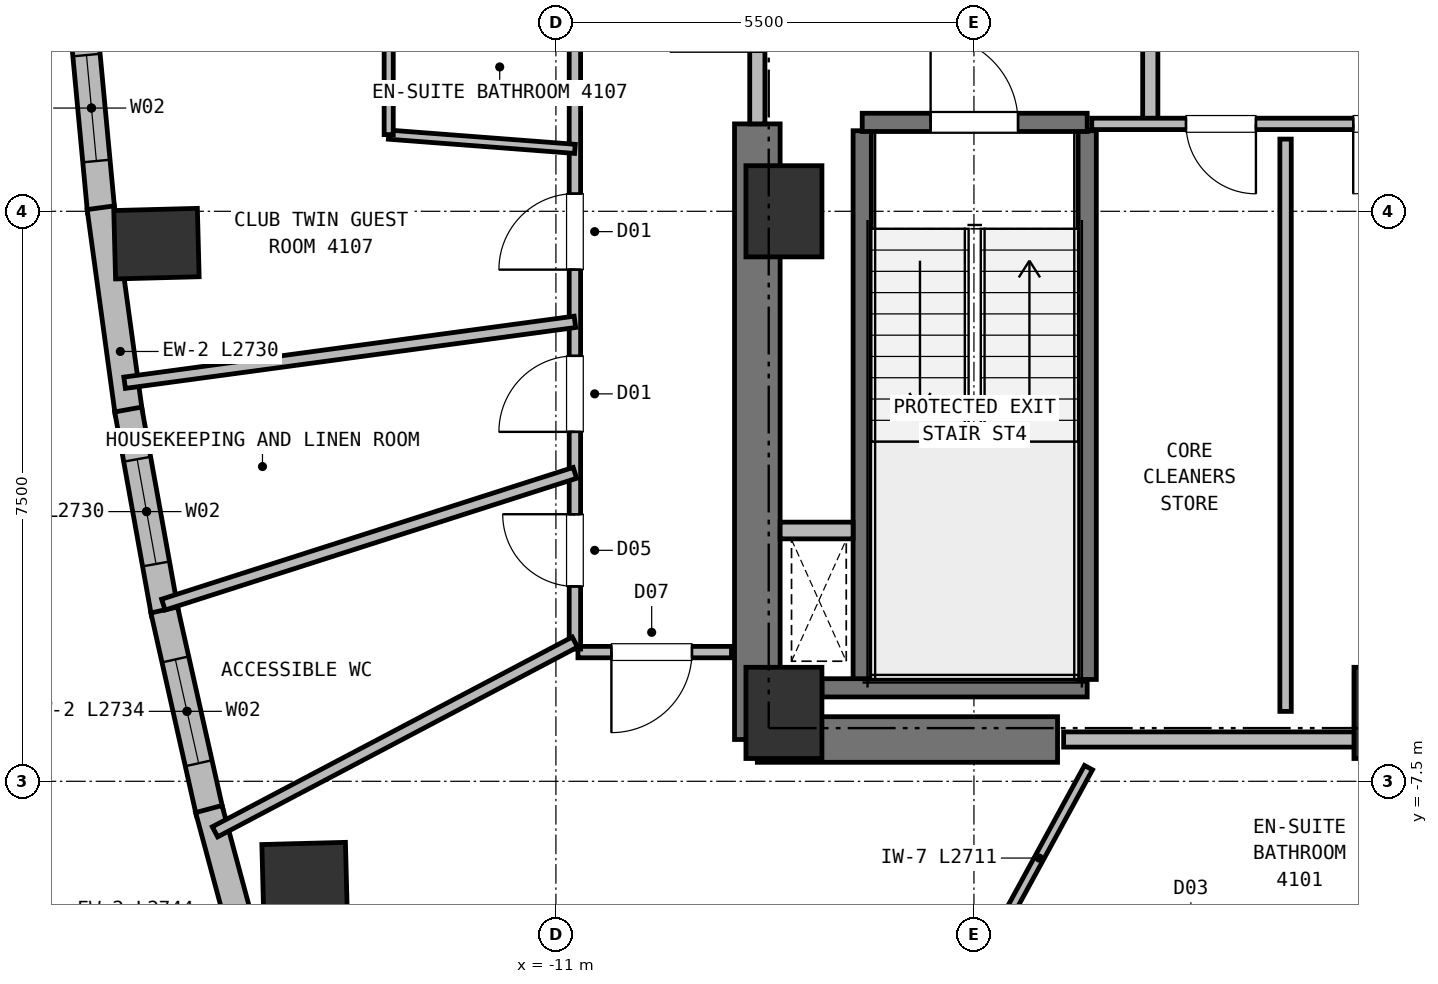
"""IFC4 building model, lengths in metres.
Left out: names, types, materials, properties, quantities, classifications, styles, units other than length and angle.
Written with IfcOpenShell. Run it as: python <this file> out.ifc"""

import sys

from ifc_helpers import new_model, si_unit, direction, frame, frame_2d, origin, origin_2d, place, context, subcontext, project, spatial, rectangle, extrude, element, fill, save


model = new_model("IFC4")
c1 = context("Model", 3, precision=1e-05, world=origin(), true_north=direction((0.0, 1.0)))
c2 = subcontext(c1, "Body", "Model", "MODEL_VIEW")
j1 = project(units=[si_unit("LENGTHUNIT", "METRE"), si_unit("PLANEANGLEUNIT", "RADIAN")], contexts=[c1])
p1 = place(None, origin())
s1 = spatial("IfcSite", under=j1, at=p1, CompositionType="ELEMENT")
p2 = place(p1, origin())
s2 = spatial("IfcBuilding", under=s1, at=p2, CompositionType="ELEMENT")
p3 = place(p2, frame((0.0, 0.0, 153.5)))
s3 = spatial("IfcBuildingStorey", under=s2, at=p3, CompositionType="ELEMENT", Elevation=153.5)
for number, where, z_axis, x_axis in (
    (1, (-8.0, -6.6, 0.0), (0.0, 0.0, 1.0), (1.0, 0.0, 0.0)),
    (2, (0.0, -6.6, 0.0), (0.0, 0.0, 1.0), (1.0, 0.0, 0.0)),
    (3, (-8.0, 0.0, 0.0), (0.0, 0.0, 1.0), (1.0, 0.0, 0.0)),
):
    element("IfcColumn", number, at=place(p3, frame(where, z_axis=z_axis, x_axis=x_axis)), inside=s3, PredefinedType="COLUMN", context=c2, shape_type="SweptSolid", body=[
        extrude(rectangle(XDim=1.0, YDim=1.2, at=origin_2d()), origin(), (0.0, 0.0, 1.0), 3.75),
    ])
p4 = place(p3, frame((-8.35, -6.95, 0.0), z_axis=(0.0, 0.0, 1.0), x_axis=(1.0, 0.0, 0.0)))
e4 = element("IfcWall", 4, at=p4, inside=s3, PredefinedType="SHEAR", context=c2, shape_type="SweptSolid", body=[
    extrude(rectangle(XDim=3.95, YDim=0.6, at=frame_2d((1.975, 0.0))), origin(), (0.0, 0.0, 1.0), 3.5),
])
p5 = place(p3, frame((-8.35, -6.95, 0.0), z_axis=(0.0, 0.0, 1.0), x_axis=(0.0, 1.0, 0.0)))
e5 = element("IfcWall", 5, at=p5, inside=s3, PredefinedType="SHEAR", context=c2, shape_type="SweptSolid", body=[
    extrude(rectangle(XDim=8.1, YDim=0.6, at=frame_2d((4.05, 0.0))), origin(), (0.0, 0.0, 1.0), 3.5),
])
for number, where, z_axis, x_axis in (
    (6, (-16.255, -0.426, 0.0), (0.0, 0.0, 1.0), (-0.026, 1.0, 0.0)),
    (7, (-14.307, -8.768, 0.0), (0.0, 0.0, 1.0), (-0.026, 1.0, 0.0)),
):
    element("IfcColumn", number, at=place(p3, frame(where, z_axis=z_axis, x_axis=x_axis)), inside=s3, PredefinedType="COLUMN", context=c2, shape_type="SweptSolid", body=[
        extrude(rectangle(XDim=0.9, YDim=1.1, at=origin_2d()), origin(), (0.0, 0.0, 1.0), 3.75),
    ])
p6 = place(p3, frame((-16.983, -0.003, 0.0), z_axis=(0.0, 0.0, 1.0), x_axis=(-0.09321624124, 0.995645887035, 0.0)))
e8 = element("IfcWall", 8, at=p6, inside=s3, PredefinedType="SOLIDWALL", context=c2, shape_type="SweptSolid", body=[
    extrude(rectangle(XDim=2.734, YDim=0.36, at=frame_2d((1.367, 0.0))), origin(), (0.0, 0.0, 1.0), 3.5),
])
p7 = place(p6, frame((0.667, 0.0, 0.72)))
e9 = element("IfcOpeningElement", 9, at=p7, cuts=e8, PredefinedType="OPENING", context=c2, shape_type="SweptSolid", body=[
    extrude(rectangle(XDim=1.4, YDim=1.84, at=frame_2d((0.7, 0.92))), frame((0.0, 0.19, 0.0), z_axis=(0.0, -1.0, 0.0), x_axis=(1.0, 0.0, 0.0)), (0.0, 0.0, 1.0), 0.38),
])
p8 = place(p3, frame((-16.62, -2.658, 0.0), z_axis=(0.0, 0.0, 1.0), x_axis=(-0.135408542402, 0.99078984989, 0.0)))
e10 = element("IfcWall", 10, at=p8, inside=s3, PredefinedType="SOLIDWALL", context=c2, shape_type="SweptSolid", body=[
    extrude(rectangle(XDim=2.73, YDim=0.36, at=frame_2d((1.365, 0.0))), origin(), (0.0, 0.0, 1.0), 3.5),
])
p9 = place(p3, frame((-16.143, -5.294, 0.0), z_axis=(0.0, 0.0, 1.0), x_axis=(-0.177366119488, 0.984144938339, 0.0)))
e11 = element("IfcWall", 11, at=p9, inside=s3, PredefinedType="SOLIDWALL", context=c2, shape_type="SweptSolid", body=[
    extrude(rectangle(XDim=2.729, YDim=0.36, at=frame_2d((1.365, 0.0))), origin(), (0.0, 0.0, 1.0), 3.5),
])
p10 = place(p9, frame((0.665, 0.0, 0.72)))
e12 = element("IfcOpeningElement", 12, at=p10, cuts=e11, PredefinedType="OPENING", context=c2, shape_type="SweptSolid", body=[
    extrude(rectangle(XDim=1.4, YDim=1.84, at=frame_2d((0.7, 0.92))), frame((0.0, 0.19, 0.0), z_axis=(0.0, -1.0, 0.0), x_axis=(1.0, 0.0, 0.0)), (0.0, 0.0, 1.0), 0.38),
])
p11 = place(p3, frame((-15.554, -7.914, 0.0), z_axis=(0.0, 0.0, 1.0), x_axis=(-0.219019260065, 0.975720535666, 0.0)))
e13 = element("IfcWall", 13, at=p11, inside=s3, PredefinedType="SOLIDWALL", context=c2, shape_type="SweptSolid", body=[
    extrude(rectangle(XDim=2.734, YDim=0.36, at=frame_2d((1.367, 0.0))), origin(), (0.0, 0.0, 1.0), 3.5),
])
p12 = place(p11, frame((0.667, 0.0, 0.72)))
e14 = element("IfcOpeningElement", 14, at=p12, cuts=e13, PredefinedType="OPENING", context=c2, shape_type="SweptSolid", body=[
    extrude(rectangle(XDim=1.4, YDim=1.84, at=frame_2d((0.7, 0.92))), frame((0.0, 0.19, 0.0), z_axis=(0.0, -1.0, 0.0), x_axis=(1.0, 0.0, 0.0)), (0.0, 0.0, 1.0), 0.38),
])
p13 = place(p3, frame((-14.853, -10.515, 0.0), z_axis=(0.0, 0.0, 1.0), x_axis=(-0.259976664172, 0.965614899474, 0.0)))
e15 = element("IfcWall", 15, at=p13, inside=s3, PredefinedType="SOLIDWALL", context=c2, shape_type="SweptSolid", body=[
    extrude(rectangle(XDim=2.744, YDim=0.36, at=frame_2d((1.372, 0.0))), origin(), (0.0, 0.0, 1.0), 3.5),
])
p14 = place(p3, frame((-6.97, -6.16, 0.0), z_axis=(0.0, 0.0, 1.0), x_axis=(0.0, 1.0, 0.0)))
e16 = element("IfcWall", 16, at=p14, inside=s3, PredefinedType="SHEAR", context=c2, shape_type="SweptSolid", body=[
    extrude(rectangle(XDim=7.22, YDim=0.24, at=frame_2d((3.61, 0.0))), origin(), (0.0, 0.0, 1.0), 3.5),
])
p15 = place(p3, frame((-7.5, -6.27, 0.0), z_axis=(0.0, 0.0, 1.0), x_axis=(1.0, 0.0, 0.0)))
e17 = element("IfcWall", 17, at=p15, inside=s3, PredefinedType="SHEAR", context=c2, shape_type="SweptSolid", body=[
    extrude(rectangle(XDim=3.49, YDim=0.24, at=frame_2d((1.745, 0.0))), origin(), (0.0, 0.0, 1.0), 3.5),
])
p16 = place(p3, frame((-4.01, -6.16, 0.0), z_axis=(0.0, 0.0, 1.0), x_axis=(0.0, 1.0, 0.0)))
e18 = element("IfcWall", 18, at=p16, inside=s3, PredefinedType="SHEAR", context=c2, shape_type="SweptSolid", body=[
    extrude(rectangle(XDim=7.22, YDim=0.24, at=frame_2d((3.61, 0.0))), origin(), (0.0, 0.0, 1.0), 3.5),
])
p17 = place(p3, frame((-6.97, 1.17, 0.0), z_axis=(0.0, 0.0, 1.0), x_axis=(1.0, 0.0, 0.0)))
e19 = element("IfcWall", 19, at=p17, inside=s3, PredefinedType="SHEAR", context=c2, shape_type="SweptSolid", body=[
    extrude(rectangle(XDim=2.96, YDim=0.24, at=frame_2d((1.48, 0.0))), origin(), (0.0, 0.0, 1.0), 3.5),
])
p18 = place(p17, frame((0.9, 0.0, 0.0)))
e20 = element("IfcOpeningElement", 20, at=p18, cuts=e19, PredefinedType="OPENING", context=c2, shape_type="SweptSolid", body=[
    extrude(rectangle(XDim=1.15, YDim=2.15, at=frame_2d((0.575, 1.075))), frame((0.0, 0.13, 0.0), z_axis=(0.0, -1.0, 0.0), x_axis=(1.0, 0.0, 0.0)), (0.0, 0.0, 1.0), 0.26),
])
p19 = place(p3, frame((-8.05, -4.2, 0.0), z_axis=(0.0, 0.0, 1.0), x_axis=(1.0, 0.0, 0.0)))
e21 = element("IfcWall", 21, at=p19, inside=s3, PredefinedType="PARTITIONING", context=c2, shape_type="SweptSolid", body=[
    extrude(rectangle(XDim=0.96, YDim=0.22, at=frame_2d((0.48, 0.0))), origin(), (0.0, 0.0, 1.0), 3.5),
])
p20 = place(p3, frame((-3.18, 1.15, 0.0), z_axis=(0.0, 0.0, 1.0), x_axis=(0.0, 1.0, 0.0)))
e22 = element("IfcWall", 22, at=p20, inside=s3, PredefinedType="PARTITIONING", context=c2, shape_type="SweptSolid", body=[
    extrude(rectangle(XDim=3.3, YDim=0.2, at=frame_2d((1.65, 0.0))), origin(), (0.0, 0.0, 1.0), 3.5),
])
p21 = place(p20, frame((1.08, 0.0, 0.0)))
e23 = element("IfcOpeningElement", 23, at=p21, cuts=e22, PredefinedType="OPENING", context=c2, shape_type="SweptSolid", body=[
    extrude(rectangle(XDim=1.15, YDim=2.15, at=frame_2d((0.575, 1.075))), frame((0.0, 0.11, 0.0), z_axis=(0.0, -1.0, 0.0), x_axis=(1.0, 0.0, 0.0)), (0.0, 0.0, 1.0), 0.22),
])
p22 = place(p3, frame((-8.35, 1.15, 0.0), z_axis=(0.0, 0.0, 1.0), x_axis=(0.0, 1.0, 0.0)))
e24 = element("IfcWall", 24, at=p22, inside=s3, PredefinedType="PARTITIONING", context=c2, shape_type="SweptSolid", body=[
    extrude(rectangle(XDim=5.4, YDim=0.2, at=frame_2d((2.7, 0.0))), origin(), (0.0, 0.0, 1.0), 3.5),
])
p23 = place(p22, frame((0.95, 0.0, 0.0)))
e25 = element("IfcOpeningElement", 25, at=p23, cuts=e24, PredefinedType="OPENING", context=c2, shape_type="SweptSolid", body=[
    extrude(rectangle(XDim=1.15, YDim=2.15, at=frame_2d((0.575, 1.075))), frame((0.0, 0.11, 0.0), z_axis=(0.0, -1.0, 0.0), x_axis=(1.0, 0.0, 0.0)), (0.0, 0.0, 1.0), 0.22),
])
p24 = place(p3, frame((3.95, 1.15, 0.0), z_axis=(0.0, 0.0, 1.0), x_axis=(-1.0, 0.0, 0.0)))
e26 = element("IfcWall", 26, at=p24, inside=s3, PredefinedType="PARTITIONING", context=c2, shape_type="SweptSolid", body=[
    extrude(rectangle(XDim=7.9, YDim=0.15, at=frame_2d((3.95, 0.0))), origin(), (0.0, 0.0, 1.0), 3.5),
])
p25 = place(p24, frame((5.74, 0.0, 0.0)))
e27 = element("IfcOpeningElement", 27, at=p25, cuts=e26, PredefinedType="OPENING", context=c2, shape_type="SweptSolid", body=[
    extrude(rectangle(XDim=0.92, YDim=2.05, at=frame_2d((0.46, 1.025))), frame((0.0, 0.085, 0.0), z_axis=(0.0, -1.0, 0.0), x_axis=(1.0, 0.0, 0.0)), (0.0, 0.0, 1.0), 0.17),
])
p26 = place(p24, frame((3.54, 0.0, 0.0)))
e28 = element("IfcOpeningElement", 28, at=p26, cuts=e26, PredefinedType="OPENING", context=c2, shape_type="SweptSolid", body=[
    extrude(rectangle(XDim=0.92, YDim=2.05, at=frame_2d((0.46, 1.025))), frame((0.0, 0.085, 0.0), z_axis=(0.0, -1.0, 0.0), x_axis=(1.0, 0.0, 0.0)), (0.0, 0.0, 1.0), 0.17),
])
p27 = place(p24, frame((1.29, 0.0, 0.0)))
e29 = element("IfcOpeningElement", 29, at=p27, cuts=e26, PredefinedType="OPENING", context=c2, shape_type="SweptSolid", body=[
    extrude(rectangle(XDim=0.92, YDim=2.05, at=frame_2d((0.46, 1.025))), frame((0.0, 0.085, 0.0), z_axis=(0.0, -1.0, 0.0), x_axis=(1.0, 0.0, 0.0)), (0.0, 0.0, 1.0), 0.17),
])
p28 = place(p3, frame((-4.32, -6.95, 0.0), z_axis=(0.0, 0.0, 1.0), x_axis=(1.0, 0.0, 0.0)))
e30 = element("IfcWall", 30, at=p28, inside=s3, PredefinedType="PARTITIONING", context=c2, shape_type="SweptSolid", body=[
    extrude(rectangle(XDim=4.32, YDim=0.2, at=frame_2d((2.16, 0.0))), origin(), (0.0, 0.0, 1.0), 3.5),
])
p29 = place(p3, frame((-1.4, -6.58, 0.0), z_axis=(0.0, 0.0, 1.0), x_axis=(0.0, 1.0, 0.0)))
e31 = element("IfcWall", 31, at=p29, inside=s3, PredefinedType="PARTITIONING", context=c2, shape_type="SweptSolid", body=[
    extrude(rectangle(XDim=7.53, YDim=0.15, at=frame_2d((3.765, 0.0))), origin(), (0.0, 0.0, 1.0), 3.5),
])
p30 = place(p3, frame((-8.69, -5.8, 0.0), z_axis=(0.0, 0.0, 1.0), x_axis=(-1.0, 0.0, 0.0)))
e32 = element("IfcWall", 32, at=p30, inside=s3, PredefinedType="PARTITIONING", context=c2, shape_type="SweptSolid", body=[
    extrude(rectangle(XDim=2.02, YDim=0.15, at=frame_2d((1.01, 0.0))), origin(), (0.0, 0.0, 1.0), 3.5),
])
p31 = place(p30, frame((0.52, 0.0, 0.0)))
e33 = element("IfcOpeningElement", 33, at=p31, cuts=e32, PredefinedType="OPENING", context=c2, shape_type="SweptSolid", body=[
    extrude(rectangle(XDim=1.06, YDim=2.15, at=frame_2d((0.53, 1.075))), frame((0.0, 0.085, 0.0), z_axis=(0.0, -1.0, 0.0), x_axis=(1.0, 0.0, 0.0)), (0.0, 0.0, 1.0), 0.17),
])
p32 = place(p3, frame((-10.75, -5.76, 0.0), z_axis=(0.0, 0.0, 1.0), x_axis=(0.0, 1.0, 0.0)))
e34 = element("IfcWall", 34, at=p32, inside=s3, PredefinedType="PARTITIONING", context=c2, shape_type="SweptSolid", body=[
    extrude(rectangle(XDim=12.92, YDim=0.15, at=frame_2d((6.46, 0.0))), origin(), (0.0, 0.0, 1.0), 3.5),
])
p33 = place(p32, frame((0.824, 0.0, 0.0)))
e35 = element("IfcOpeningElement", 35, at=p33, cuts=e34, PredefinedType="OPENING", context=c2, shape_type="SweptSolid", body=[
    extrude(rectangle(XDim=0.95, YDim=2.1, at=frame_2d((0.475, 1.05))), frame((0.0, 0.085, 0.0), z_axis=(0.0, -1.0, 0.0), x_axis=(1.0, 0.0, 0.0)), (0.0, 0.0, 1.0), 0.17),
])
p34 = place(p32, frame((2.858, 0.0, 0.0)))
e36 = element("IfcOpeningElement", 36, at=p34, cuts=e34, PredefinedType="OPENING", context=c2, shape_type="SweptSolid", body=[
    extrude(rectangle(XDim=1.0, YDim=2.15, at=frame_2d((0.5, 1.075))), frame((0.0, 0.085, 0.0), z_axis=(0.0, -1.0, 0.0), x_axis=(1.0, 0.0, 0.0)), (0.0, 0.0, 1.0), 0.17),
])
p35 = place(p32, frame((4.992, 0.0, 0.0)))
e37 = element("IfcOpeningElement", 37, at=p35, cuts=e34, PredefinedType="OPENING", context=c2, shape_type="SweptSolid", body=[
    extrude(rectangle(XDim=1.0, YDim=2.15, at=frame_2d((0.5, 1.075))), frame((0.0, 0.085, 0.0), z_axis=(0.0, -1.0, 0.0), x_axis=(1.0, 0.0, 0.0)), (0.0, 0.0, 1.0), 0.17),
])
p36 = place(p32, frame((10.523, 0.0, 0.0)))
e38 = element("IfcOpeningElement", 38, at=p36, cuts=e34, PredefinedType="OPENING", context=c2, shape_type="SweptSolid", body=[
    extrude(rectangle(XDim=1.0, YDim=2.15, at=frame_2d((0.5, 1.075))), frame((0.0, 0.085, 0.0), z_axis=(0.0, -1.0, 0.0), x_axis=(1.0, 0.0, 0.0)), (0.0, 0.0, 1.0), 0.17),
])
p37 = place(p3, frame((-10.75, -5.668, 0.0), z_axis=(0.0, 0.0, 1.0), x_axis=(-0.884578678767, -0.466390995915, 0.0)))
e39 = element("IfcWall", 39, at=p37, inside=s3, PredefinedType="PARTITIONING", context=c2, shape_type="SweptSolid", body=[
    extrude(rectangle(XDim=5.354, YDim=0.15, at=frame_2d((2.677, 0.0))), origin(), (0.0, 0.0, 1.0), 3.5),
])
p38 = place(p3, frame((-3.993, -7.32, 0.0), z_axis=(0.0, 0.0, 1.0), x_axis=(-0.478915225664, -0.877861154527, 0.0)))
e40 = element("IfcWall", 40, at=p38, inside=s3, PredefinedType="PARTITIONING", context=c2, shape_type="SweptSolid", body=[
    extrude(rectangle(XDim=2.711, YDim=0.12, at=frame_2d((1.355, 0.0))), origin(), (0.0, 0.0, 1.0), 3.5),
])
p39 = place(p3, frame((-13.2, 1.009, 0.0), z_axis=(0.0, 0.0, 1.0), x_axis=(0.997091773564, -0.076210203321, 0.0)))
e41 = element("IfcWall", 41, at=p39, inside=s3, PredefinedType="PARTITIONING", context=c2, shape_type="SweptSolid", body=[
    extrude(rectangle(XDim=2.457, YDim=0.12, at=frame_2d((1.229, 0.0))), origin(), (0.0, 0.0, 1.0), 3.5),
])
p40 = place(p3, frame((-13.2, 1.009, 0.0), z_axis=(0.0, 0.0, 1.0), x_axis=(0.0, 1.0, 0.0)))
e42 = element("IfcWall", 42, at=p40, inside=s3, PredefinedType="PARTITIONING", context=c2, shape_type="SweptSolid", body=[
    extrude(rectangle(XDim=3.247, YDim=0.12, at=frame_2d((1.624, 0.0))), origin(), (0.0, 0.0, 1.0), 3.5),
])
p41 = place(p40, frame((1.164, 0.0, 0.0)))
e43 = element("IfcOpeningElement", 43, at=p41, cuts=e42, PredefinedType="OPENING", context=c2, shape_type="SweptSolid", body=[
    extrude(rectangle(XDim=0.92, YDim=2.1, at=frame_2d((0.46, 1.05))), frame((0.0, 0.07, 0.0), z_axis=(0.0, -1.0, 0.0), x_axis=(1.0, 0.0, 0.0)), (0.0, 0.0, 1.0), 0.14),
])
p42 = place(p3, frame((-10.75, -1.455, 0.0), z_axis=(0.0, 0.0, 1.0), x_axis=(-0.990972499341, -0.134065303306, 0.0)))
e44 = element("IfcWall", 44, at=p42, inside=s3, PredefinedType="PARTITIONING", context=c2, shape_type="SweptSolid", body=[
    extrude(rectangle(XDim=5.979, YDim=0.15, at=frame_2d((2.989, 0.0))), origin(), (0.0, 0.0, 1.0), 3.5),
])
p43 = place(p3, frame((-10.75, -3.442, 0.0), z_axis=(0.0, 0.0, 1.0), x_axis=(-0.952377767895, -0.304920624457, 0.0)))
e45 = element("IfcWall", 45, at=p43, inside=s3, PredefinedType="PARTITIONING", context=c2, shape_type="SweptSolid", body=[
    extrude(rectangle(XDim=5.686, YDim=0.15, at=frame_2d((2.843, 0.0))), origin(), (0.0, 0.0, 1.0), 3.5),
])
p44 = place(p7, origin())
e46 = element("IfcWindow", 46, at=p44, inside=s3, PartitioningType="SINGLE_PANEL", PredefinedType="WINDOW", context=c2, shape_type="SweptSolid", body=[
    extrude(rectangle(XDim=1.4, YDim=1.84, at=frame_2d((0.7, 0.92))), frame((0.0, 0.03, 0.0), z_axis=(0.0, -1.0, 0.0), x_axis=(1.0, 0.0, 0.0)), (0.0, 0.0, 1.0), 0.06),
])
fill(e9, e46)
p45 = place(p10, origin())
e47 = element("IfcWindow", 47, at=p45, inside=s3, PartitioningType="SINGLE_PANEL", PredefinedType="WINDOW", context=c2, shape_type="SweptSolid", body=[
    extrude(rectangle(XDim=1.4, YDim=1.84, at=frame_2d((0.7, 0.92))), frame((0.0, 0.03, 0.0), z_axis=(0.0, -1.0, 0.0), x_axis=(1.0, 0.0, 0.0)), (0.0, 0.0, 1.0), 0.06),
])
fill(e12, e47)
p46 = place(p12, origin())
e48 = element("IfcWindow", 48, at=p46, inside=s3, PartitioningType="SINGLE_PANEL", PredefinedType="WINDOW", context=c2, shape_type="SweptSolid", body=[
    extrude(rectangle(XDim=1.4, YDim=1.84, at=frame_2d((0.7, 0.92))), frame((0.0, 0.03, 0.0), z_axis=(0.0, -1.0, 0.0), x_axis=(1.0, 0.0, 0.0)), (0.0, 0.0, 1.0), 0.06),
])
fill(e14, e48)
p47 = place(p18, origin())
e49 = element("IfcDoor", 49, at=p47, inside=s3, OperationType="SINGLE_SWING_LEFT", PredefinedType="DOOR", context=c2, shape_type="SweptSolid", body=[
    extrude(rectangle(XDim=1.15, YDim=2.15, at=frame_2d((0.575, 1.075))), frame((0.0, 0.025, 0.0), z_axis=(0.0, -1.0, 0.0), x_axis=(1.0, 0.0, 0.0)), (0.0, 0.0, 1.0), 0.05),
])
fill(e20, e49)
p48 = place(p23, origin())
e50 = element("IfcDoor", 50, at=p48, inside=s3, OperationType="SINGLE_SWING_LEFT", PredefinedType="DOOR", context=c2, shape_type="SweptSolid", body=[
    extrude(rectangle(XDim=1.15, YDim=2.15, at=frame_2d((0.575, 1.075))), frame((0.0, 0.025, 0.0), z_axis=(0.0, -1.0, 0.0), x_axis=(1.0, 0.0, 0.0)), (0.0, 0.0, 1.0), 0.05),
])
fill(e25, e50)
p49 = place(p25, origin())
e51 = element("IfcDoor", 51, at=p49, inside=s3, OperationType="SINGLE_SWING_LEFT", PredefinedType="DOOR", context=c2, shape_type="SweptSolid", body=[
    extrude(rectangle(XDim=0.92, YDim=2.05, at=frame_2d((0.46, 1.025))), frame((0.0, 0.025, 0.0), z_axis=(0.0, -1.0, 0.0), x_axis=(1.0, 0.0, 0.0)), (0.0, 0.0, 1.0), 0.05),
])
fill(e27, e51)
p50 = place(p26, origin())
e52 = element("IfcDoor", 52, at=p50, inside=s3, OperationType="SINGLE_SWING_RIGHT", PredefinedType="DOOR", context=c2, shape_type="SweptSolid", body=[
    extrude(rectangle(XDim=0.92, YDim=2.05, at=frame_2d((0.46, 1.025))), frame((0.0, 0.025, 0.0), z_axis=(0.0, -1.0, 0.0), x_axis=(1.0, 0.0, 0.0)), (0.0, 0.0, 1.0), 0.05),
])
fill(e28, e52)
p51 = place(p33, origin())
e53 = element("IfcDoor", 53, at=p51, inside=s3, OperationType="SINGLE_SWING_RIGHT", PredefinedType="DOOR", context=c2, shape_type="SweptSolid", body=[
    extrude(rectangle(XDim=0.95, YDim=2.1, at=frame_2d((0.475, 1.05))), frame((0.0, 0.025, 0.0), z_axis=(0.0, -1.0, 0.0), x_axis=(1.0, 0.0, 0.0)), (0.0, 0.0, 1.0), 0.05),
])
fill(e35, e53)
p52 = place(p34, origin())
e54 = element("IfcDoor", 54, at=p52, inside=s3, OperationType="SINGLE_SWING_LEFT", PredefinedType="DOOR", context=c2, shape_type="SweptSolid", body=[
    extrude(rectangle(XDim=1.0, YDim=2.15, at=frame_2d((0.5, 1.075))), frame((0.0, 0.025, 0.0), z_axis=(0.0, -1.0, 0.0), x_axis=(1.0, 0.0, 0.0)), (0.0, 0.0, 1.0), 0.05),
])
fill(e36, e54)
p53 = place(p35, origin())
e55 = element("IfcDoor", 55, at=p53, inside=s3, OperationType="SINGLE_SWING_LEFT", PredefinedType="DOOR", context=c2, shape_type="SweptSolid", body=[
    extrude(rectangle(XDim=1.0, YDim=2.15, at=frame_2d((0.5, 1.075))), frame((0.0, 0.025, 0.0), z_axis=(0.0, -1.0, 0.0), x_axis=(1.0, 0.0, 0.0)), (0.0, 0.0, 1.0), 0.05),
])
fill(e37, e55)
p54 = place(p31, origin())
e56 = element("IfcDoor", 56, at=p54, inside=s3, OperationType="SINGLE_SWING_RIGHT", PredefinedType="DOOR", context=c2, shape_type="SweptSolid", body=[
    extrude(rectangle(XDim=1.06, YDim=2.15, at=frame_2d((0.53, 1.075))), frame((0.0, 0.025, 0.0), z_axis=(0.0, -1.0, 0.0), x_axis=(1.0, 0.0, 0.0)), (0.0, 0.0, 1.0), 0.05),
])
fill(e33, e56)
save(model, sys.argv[1])
